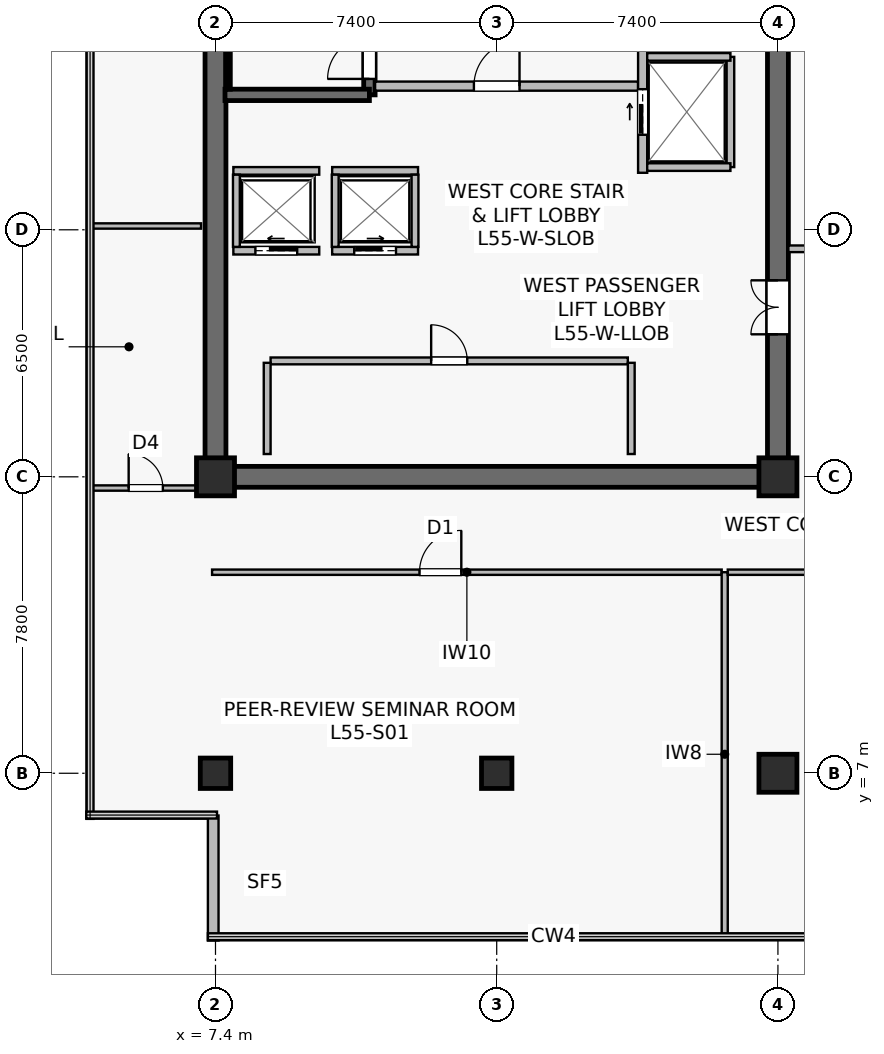
"""IFC4 building model, lengths in metres.
Left out: names, types, materials, properties, quantities, classifications, styles, units other than length and angle.
Written with IfcOpenShell. Run it as: python <this file> out.ifc"""

import sys

from ifc_helpers import new_model, si_unit, direction, frame, frame_2d, origin, origin_2d, place, context, subcontext, project, spatial, rectangle, extrude, source, transform, mapped, element, fill, save


model = new_model("IFC4")
c1 = context("Model", 3, precision=1e-05, world=origin(), true_north=direction((0.0, 1.0)))
c2 = subcontext(c1, "Body", "Model", "MODEL_VIEW")
j1 = project(units=[si_unit("LENGTHUNIT", "METRE"), si_unit("PLANEANGLEUNIT", "RADIAN")], contexts=[c1])
p1 = place(None, origin())
s1 = spatial("IfcSite", under=j1, at=p1, CompositionType="ELEMENT")
p2 = place(p1, origin())
s2 = spatial("IfcBuilding", under=s1, at=p2, CompositionType="ELEMENT")
p3 = place(p2, frame((0.0, 0.0, 230.1)))
s3 = spatial("IfcBuildingStorey", under=s2, at=p3, CompositionType="ELEMENT", Elevation=230.1)
p4 = place(p3, frame((7.125, 14.8, 0.0), z_axis=(0.0, 0.0, 1.0), x_axis=(1.0, 0.0, 0.0)))
e1 = element("IfcWall", 1, at=p4, inside=s3, PredefinedType="SHEAR", context=c2, shape_type="SweptSolid", body=[
    extrude(rectangle(XDim=15.35, YDim=0.55, at=frame_2d((7.675, 0.0))), origin(), (0.0, 0.0, 1.0), 3.8),
])
p5 = place(p3, frame((7.4, 15.075, 0.0), z_axis=(0.0, 0.0, 1.0), x_axis=(0.0, 1.0, 0.0)))
e2 = element("IfcWall", 2, at=p5, inside=s3, PredefinedType="SHEAR", context=c2, shape_type="SweptSolid", body=[
    extrude(rectangle(XDim=18.45, YDim=0.55, at=frame_2d((9.225, 0.0))), origin(), (0.0, 0.0, 1.0), 3.8),
])
p6 = place(p3, frame((22.2, 15.075, 0.0), z_axis=(0.0, 0.0, 1.0), x_axis=(0.0, 1.0, 0.0)))
e3 = element("IfcWall", 3, at=p6, inside=s3, PredefinedType="SHEAR", context=c2, shape_type="SweptSolid", body=[
    extrude(rectangle(XDim=18.45, YDim=0.55, at=frame_2d((9.225, 0.0))), origin(), (0.0, 0.0, 1.0), 3.8),
])
p7 = place(p6, frame((3.475, 0.0, 0.0)))
e4 = element("IfcOpeningElement", 4, at=p7, cuts=e3, PredefinedType="OPENING", context=c2, shape_type="SweptSolid", body=[
    extrude(rectangle(XDim=1.42, YDim=2.2, at=frame_2d((0.71, 1.1))), frame((0.0, 0.285, 0.0), z_axis=(0.0, -1.0, 0.0), x_axis=(1.0, 0.0, 0.0)), (0.0, 0.0, 1.0), 0.57),
])
p8 = place(p3, frame((11.45, 24.85, 0.0), z_axis=(0.0, 0.0, 1.0), x_axis=(0.0, 1.0, 0.0)))
e5 = element("IfcWall", 5, at=p8, inside=s3, PredefinedType="SHEAR", context=c2, shape_type="SweptSolid", body=[
    extrude(rectangle(XDim=8.63, YDim=0.3, at=frame_2d((4.315, 0.0))), origin(), (0.0, 0.0, 1.0), 3.8),
])
p9 = place(p8, frame((0.42, 0.0, 0.0)))
e6 = element("IfcOpeningElement", 6, at=p9, cuts=e5, PredefinedType="OPENING", context=c2, shape_type="SweptSolid", body=[
    extrude(rectangle(XDim=1.1, YDim=2.15, at=frame_2d((0.55, 1.075))), frame((0.0, 0.16, 0.0), z_axis=(0.0, -1.0, 0.0), x_axis=(1.0, 0.0, 0.0)), (0.0, 0.0, 1.0), 0.32),
])
p10 = place(p3, frame((7.65, 24.85, 0.0), z_axis=(0.0, 0.0, 1.0), x_axis=(1.0, 0.0, 0.0)))
e7 = element("IfcWall", 7, at=p10, inside=s3, PredefinedType="SHEAR", context=c2, shape_type="SweptSolid", body=[
    extrude(rectangle(XDim=3.8, YDim=0.3, at=frame_2d((1.9, 0.0))), origin(), (0.0, 0.0, 1.0), 3.8),
])
p11 = place(p3, frame((7.73, 25.0, 0.0), z_axis=(0.0, 0.0, 1.0), x_axis=(0.0, 1.0, 0.0)))
e8 = element("IfcWall", 8, at=p11, inside=s3, PredefinedType="SOLIDWALL", context=c2, shape_type="SweptSolid", body=[
    extrude(rectangle(XDim=8.32, YDim=0.12, at=frame_2d((4.16, 0.0))), origin(), (0.0, 0.0, 1.0), 3.8),
])
m1 = source(origin(), c2, "Body", "SweptSolid", [
    extrude(rectangle(XDim=0.8, YDim=0.8, at=origin_2d()), origin(), (0.0, 0.0, 1.0), 4.1),
])
p12 = place(p3, frame((14.8, 7.0, 0.0), z_axis=(0.0, 0.0, 1.0), x_axis=(1.0, 0.0, 0.0)))
e9 = element("IfcColumn", 9, at=p12, inside=s3, PredefinedType="COLUMN", context=c2, shape_type="MappedRepresentation", body=[
    mapped(m1, transform((0.0, 0.0, 0.0), scale=1.0)),
])
m2 = source(origin(), c2, "Body", "SweptSolid", [
    extrude(rectangle(XDim=1.0, YDim=1.0, at=origin_2d()), origin(), (0.0, 0.0, 1.0), 4.1),
])
for number, where, z_axis, x_axis in (
    (10, (22.2, 7.0, 0.0), (0.0, 0.0, 1.0), (1.0, 0.0, 0.0)),
    (11, (7.4, 14.8, 0.0), (0.0, 0.0, 1.0), (1.0, 0.0, 0.0)),
    (12, (22.2, 14.8, 0.0), (0.0, 0.0, 1.0), (1.0, 0.0, 0.0)),
):
    element("IfcColumn", number, at=place(p3, frame(where, z_axis=z_axis, x_axis=x_axis)), inside=s3, PredefinedType="COLUMN", context=c2, shape_type="MappedRepresentation", body=[
        mapped(m2, transform((0.0, 0.0, 0.0), scale=1.0)),
    ])
p13 = place(p3, frame((7.4, 7.0, 0.0), z_axis=(0.0, 0.0, 1.0), x_axis=(1.0, 0.0, 0.0)))
e13 = element("IfcColumn", 13, at=p13, inside=s3, PredefinedType="COLUMN", context=c2, shape_type="MappedRepresentation", body=[
    mapped(m1, transform((0.0, 0.0, 0.0), scale=1.0)),
])
p14 = place(p3, frame((7.34, 5.888, 0.0), z_axis=(0.0, 0.0, 1.0), x_axis=(0.0, -1.0, 0.0)))
e14 = element("IfcWall", 14, at=p14, inside=s3, PredefinedType="STANDARD", context=c2, shape_type="SweptSolid", body=[
    extrude(rectangle(XDim=3.288, YDim=0.28, at=frame_2d((1.644, 0.0))), origin(), (0.0, 0.0, 1.0), 3.8),
])
p15 = place(p3, frame((11.6, 25.08, 0.0), z_axis=(0.0, 0.0, 1.0), x_axis=(1.0, 0.0, 0.0)))
e15 = element("IfcWall", 15, at=p15, inside=s3, PredefinedType="SOLIDWALL", context=c2, shape_type="SweptSolid", body=[
    extrude(rectangle(XDim=6.92, YDim=0.24, at=frame_2d((3.46, 0.0))), origin(), (0.0, 0.0, 1.0), 3.197),
])
p16 = place(p15, frame((2.6, 0.0, 0.0)))
e16 = element("IfcOpeningElement", 16, at=p16, cuts=e15, PredefinedType="OPENING", context=c2, shape_type="SweptSolid", body=[
    extrude(rectangle(XDim=1.2, YDim=2.16, at=frame_2d((0.6, 1.08))), frame((0.0, 0.13, 0.0), z_axis=(0.0, -1.0, 0.0), x_axis=(1.0, 0.0, 0.0)), (0.0, 0.0, 1.0), 0.26),
])
p17 = place(p3, frame((18.64, 22.8, 0.0), z_axis=(0.0, 0.0, 1.0), x_axis=(0.0, 1.0, 0.0)))
e17 = element("IfcWall", 17, at=p17, inside=s3, PredefinedType="SOLIDWALL", context=c2, shape_type="SweptSolid", body=[
    extrude(rectangle(XDim=6.85, YDim=0.24, at=frame_2d((3.425, 0.0))), origin(), (0.0, 0.0, 1.0), 2.935),
])
p18 = place(p17, frame((4.85, 0.0, 0.0)))
e18 = element("IfcOpeningElement", 18, at=p18, cuts=e17, PredefinedType="OPENING", context=c2, shape_type="SweptSolid", body=[
    extrude(rectangle(XDim=1.1, YDim=2.22, at=frame_2d((0.55, 1.11))), frame((0.0, 0.13, 0.0), z_axis=(0.0, -1.0, 0.0), x_axis=(1.0, 0.0, 0.0)), (0.0, 0.0, 1.0), 0.26),
])
p19 = place(p17, frame((1.0, 0.0, 0.0)))
e19 = element("IfcOpeningElement", 19, at=p19, cuts=e17, PredefinedType="OPENING", context=c2, shape_type="SweptSolid", body=[
    extrude(rectangle(XDim=1.2, YDim=2.22, at=frame_2d((0.6, 1.11))), frame((0.0, 0.13, 0.0), z_axis=(0.0, -1.0, 0.0), x_axis=(1.0, 0.0, 0.0)), (0.0, 0.0, 1.0), 0.26),
])
p20 = place(p3, frame((7.87, 20.75, 0.0), z_axis=(0.0, 0.0, 1.0), x_axis=(1.0, 0.0, 0.0)))
e20 = element("IfcWall", 20, at=p20, inside=s3, PredefinedType="SOLIDWALL", context=c2, shape_type="SweptSolid", body=[
    extrude(rectangle(XDim=2.26, YDim=0.2, at=frame_2d((1.13, 0.0))), origin(), (0.0, 0.0, 1.0), 3.8),
])
p21 = place(p20, frame((0.58, 0.0, 0.0)))
e21 = element("IfcOpeningElement", 21, at=p21, cuts=e20, PredefinedType="OPENING", context=c2, shape_type="SweptSolid", body=[
    extrude(rectangle(XDim=1.1, YDim=2.22, at=frame_2d((0.55, 1.11))), frame((0.0, 0.11, 0.0), z_axis=(0.0, -1.0, 0.0), x_axis=(1.0, 0.0, 0.0)), (0.0, 0.0, 1.0), 0.22),
])
p22 = place(p3, frame((7.87, 22.85, 0.0), z_axis=(0.0, 0.0, 1.0), x_axis=(1.0, 0.0, 0.0)))
e22 = element("IfcWall", 22, at=p22, inside=s3, PredefinedType="SOLIDWALL", context=c2, shape_type="SweptSolid", body=[
    extrude(rectangle(XDim=2.26, YDim=0.2, at=frame_2d((1.13, 0.0))), origin(), (0.0, 0.0, 1.0), 3.8),
])
p23 = place(p3, frame((7.95, 20.85, 0.0), z_axis=(0.0, 0.0, 1.0), x_axis=(0.0, 1.0, 0.0)))
e23 = element("IfcWall", 23, at=p23, inside=s3, PredefinedType="SOLIDWALL", context=c2, shape_type="SweptSolid", body=[
    extrude(rectangle(XDim=1.9, YDim=0.18, at=frame_2d((0.95, 0.0))), origin(), (0.0, 0.0, 1.0), 3.8),
])
p24 = place(p3, frame((10.47, 20.75, 0.0), z_axis=(0.0, 0.0, 1.0), x_axis=(1.0, 0.0, 0.0)))
e24 = element("IfcWall", 24, at=p24, inside=s3, PredefinedType="SOLIDWALL", context=c2, shape_type="SweptSolid", body=[
    extrude(rectangle(XDim=2.26, YDim=0.2, at=frame_2d((1.13, 0.0))), origin(), (0.0, 0.0, 1.0), 3.8),
])
p25 = place(p24, frame((0.58, 0.0, 0.0)))
e25 = element("IfcOpeningElement", 25, at=p25, cuts=e24, PredefinedType="OPENING", context=c2, shape_type="SweptSolid", body=[
    extrude(rectangle(XDim=1.1, YDim=2.22, at=frame_2d((0.55, 1.11))), frame((0.0, 0.11, 0.0), z_axis=(0.0, -1.0, 0.0), x_axis=(1.0, 0.0, 0.0)), (0.0, 0.0, 1.0), 0.22),
])
p26 = place(p3, frame((10.47, 22.85, 0.0), z_axis=(0.0, 0.0, 1.0), x_axis=(1.0, 0.0, 0.0)))
e26 = element("IfcWall", 26, at=p26, inside=s3, PredefinedType="SOLIDWALL", context=c2, shape_type="SweptSolid", body=[
    extrude(rectangle(XDim=2.26, YDim=0.2, at=frame_2d((1.13, 0.0))), origin(), (0.0, 0.0, 1.0), 3.8),
])
for number, where, z_axis, x_axis in (
    (27, (10.55, 20.85, 0.0), (0.0, 0.0, 1.0), (0.0, 1.0, 0.0)),
    (28, (12.65, 20.85, 0.0), (0.0, 0.0, 1.0), (0.0, 1.0, 0.0)),
):
    element("IfcWall", number, at=place(p3, frame(where, z_axis=z_axis, x_axis=x_axis)), inside=s3, PredefinedType="SOLIDWALL", context=c2, shape_type="SweptSolid", body=[
        extrude(rectangle(XDim=1.9, YDim=0.18, at=frame_2d((0.95, 0.0))), origin(), (0.0, 0.0, 1.0), 3.8),
    ])
p27 = place(p3, frame((20.95, 22.95, 0.0), z_axis=(0.0, 0.0, 1.0), x_axis=(0.0, 1.0, 0.0)))
e29 = element("IfcWall", 29, at=p27, inside=s3, PredefinedType="SOLIDWALL", context=c2, shape_type="SweptSolid", body=[
    extrude(rectangle(XDim=2.9, YDim=0.2, at=frame_2d((1.45, 0.0))), origin(), (0.0, 0.0, 1.0), 2.935),
])
for number, where, z_axis, x_axis in (
    (30, (18.76, 25.85, 0.0), (0.0, 0.0, 1.0), (1.0, 0.0, 0.0)),
    (31, (18.76, 22.95, 0.0), (0.0, 0.0, 1.0), (1.0, 0.0, 0.0)),
):
    element("IfcWall", number, at=place(p3, frame(where, z_axis=z_axis, x_axis=x_axis)), inside=s3, PredefinedType="SOLIDWALL", context=c2, shape_type="SweptSolid", body=[
        extrude(rectangle(XDim=2.19, YDim=0.2, at=frame_2d((1.095, 0.0))), origin(), (0.0, 0.0, 1.0), 3.8),
    ])
p28 = place(p3, frame((8.85, 17.85, 0.0), z_axis=(0.0, 0.0, 1.0), x_axis=(1.0, 0.0, 0.0)))
e32 = element("IfcWall", 32, at=p28, inside=s3, PredefinedType="SOLIDWALL", context=c2, shape_type="SweptSolid", body=[
    extrude(rectangle(XDim=9.4, YDim=0.18, at=frame_2d((4.7, 0.0))), origin(), (0.0, 0.0, 1.0), 3.197),
])
p29 = place(p28, frame((4.225, 0.0, 0.0)))
e33 = element("IfcOpeningElement", 33, at=p29, cuts=e32, PredefinedType="OPENING", context=c2, shape_type="SweptSolid", body=[
    extrude(rectangle(XDim=0.95, YDim=2.15, at=frame_2d((0.475, 1.075))), frame((0.0, 0.1, 0.0), z_axis=(0.0, -1.0, 0.0), x_axis=(1.0, 0.0, 0.0)), (0.0, 0.0, 1.0), 0.2),
])
for number, where, z_axis, x_axis in (
    (34, (18.34, 15.4, 0.0), (0.0, 0.0, 1.0), (0.0, 1.0, 0.0)),
    (35, (8.76, 15.4, 0.0), (0.0, 0.0, 1.0), (0.0, 1.0, 0.0)),
):
    element("IfcWall", number, at=place(p3, frame(where, z_axis=z_axis, x_axis=x_axis)), inside=s3, PredefinedType="SOLIDWALL", context=c2, shape_type="SweptSolid", body=[
        extrude(rectangle(XDim=2.4, YDim=0.18, at=frame_2d((1.2, 0.0))), origin(), (0.0, 0.0, 1.0), 3.8),
    ])
p30 = place(p3, frame((22.475, 20.8, 0.0), z_axis=(0.0, 0.0, 1.0), x_axis=(1.0, 0.0, 0.0)))
e36 = element("IfcWall", 36, at=p30, inside=s3, PredefinedType="PARTITIONING", context=c2, shape_type="SweptSolid", body=[
    extrude(rectangle(XDim=4.025, YDim=0.175, at=frame_2d((2.012, 0.0))), origin(), (0.0, 0.0, 1.0), 3.8),
])
p31 = place(p30, frame((1.35, 0.0, 0.0)))
e37 = element("IfcOpeningElement", 37, at=p31, cuts=e36, PredefinedType="OPENING", context=c2, shape_type="SweptSolid", body=[
    extrude(rectangle(XDim=0.95, YDim=2.15, at=frame_2d((0.475, 1.075))), frame((0.0, 0.098, 0.0), z_axis=(0.0, -1.0, 0.0), x_axis=(1.0, 0.0, 0.0)), (0.0, 0.0, 1.0), 0.195),
])
p32 = place(p3, frame((7.31, 12.29, 0.0), z_axis=(0.0, 0.0, 1.0), x_axis=(1.0, 0.0, 0.0)))
e38 = element("IfcWall", 38, at=p32, inside=s3, PredefinedType="PARTITIONING", context=c2, shape_type="SweptSolid", body=[
    extrude(rectangle(XDim=13.41, YDim=0.14, at=frame_2d((6.705, 0.0))), origin(), (0.0, 0.0, 1.0), 3.197),
])
p33 = place(p32, frame((5.458, 0.0, 0.0)))
e39 = element("IfcOpeningElement", 39, at=p33, cuts=e38, PredefinedType="OPENING", context=c2, shape_type="SweptSolid", body=[
    extrude(rectangle(XDim=1.1, YDim=2.18, at=frame_2d((0.55, 1.09))), frame((0.0, 0.08, 0.0), z_axis=(0.0, -1.0, 0.0), x_axis=(1.0, 0.0, 0.0)), (0.0, 0.0, 1.0), 0.16),
])
p34 = place(p3, frame((20.8, 2.71, 0.0), z_axis=(0.0, 0.0, 1.0), x_axis=(0.0, 1.0, 0.0)))
e40 = element("IfcWall", 40, at=p34, inside=s3, PredefinedType="PARTITIONING", context=c2, shape_type="SweptSolid", body=[
    extrude(rectangle(XDim=9.58, YDim=0.16, at=frame_2d((4.79, 0.0))), origin(), (0.0, 0.0, 1.0), 3.135),
])
p35 = place(p3, frame((20.88, 12.29, 0.0), z_axis=(0.0, 0.0, 1.0), x_axis=(1.0, 0.0, 0.0)))
e41 = element("IfcWall", 41, at=p35, inside=s3, PredefinedType="PARTITIONING", context=c2, shape_type="SweptSolid", body=[
    extrude(rectangle(XDim=23.24, YDim=0.14, at=frame_2d((11.62, 0.0))), origin(), (0.0, 0.0, 1.0), 3.197),
])
p36 = place(p35, frame((12.356, 0.0, 0.0)))
e42 = element("IfcOpeningElement", 42, at=p36, cuts=e41, PredefinedType="OPENING", context=c2, shape_type="SweptSolid", body=[
    extrude(rectangle(XDim=1.1, YDim=2.18, at=frame_2d((0.55, 1.09))), frame((0.0, 0.08, 0.0), z_axis=(0.0, -1.0, 0.0), x_axis=(1.0, 0.0, 0.0)), (0.0, 0.0, 1.0), 0.16),
])
p37 = place(p3, frame((4.11, 21.4, 0.0), z_axis=(0.0, 0.0, 1.0), x_axis=(1.0, 0.0, 0.0)))
e43 = element("IfcWall", 43, at=p37, inside=s3, PredefinedType="PARTITIONING", context=c2, shape_type="SweptSolid", body=[
    extrude(rectangle(XDim=2.91, YDim=0.14, at=frame_2d((1.455, 0.0))), origin(), (0.0, 0.0, 1.0), 3.8),
])
p38 = place(p3, frame((4.11, 14.505, 0.0), z_axis=(0.0, 0.0, 1.0), x_axis=(1.0, 0.0, 0.0)))
e44 = element("IfcWall", 44, at=p38, inside=s3, PredefinedType="PARTITIONING", context=c2, shape_type="SweptSolid", body=[
    extrude(rectangle(XDim=2.91, YDim=0.14, at=frame_2d((1.455, 0.0))), origin(), (0.0, 0.0, 1.0), 3.8),
])
p39 = place(p38, frame((1.005, 0.0, 0.0)))
e45 = element("IfcOpeningElement", 45, at=p39, cuts=e44, PredefinedType="OPENING", context=c2, shape_type="SweptSolid", body=[
    extrude(rectangle(XDim=0.9, YDim=2.1, at=frame_2d((0.45, 1.05))), frame((0.0, 0.08, 0.0), z_axis=(0.0, -1.0, 0.0), x_axis=(1.0, 0.0, 0.0)), (0.0, 0.0, 1.0), 0.16),
])
m3 = source(origin(), c2, "Body", "SweptSolid", [
    extrude(rectangle(XDim=1.1, YDim=2.15, at=frame_2d((0.55, 1.075))), frame((0.0, 0.025, 0.0), z_axis=(0.0, -1.0, 0.0), x_axis=(1.0, 0.0, 0.0)), (0.0, 0.0, 1.0), 0.05),
])
p40 = place(p9, origin())
e46 = element("IfcDoor", 46, at=p40, inside=s3, OperationType="SINGLE_SWING_LEFT", PredefinedType="DOOR", context=c2, shape_type="MappedRepresentation", body=[
    mapped(m3, transform((0.0, 0.0, 0.0), scale=1.0)),
])
fill(e6, e46)
m4 = source(origin(), c2, "Body", "SweptSolid", [
    extrude(rectangle(XDim=1.2, YDim=2.16, at=frame_2d((0.6, 1.08))), frame((0.0, 0.025, 0.0), z_axis=(0.0, -1.0, 0.0), x_axis=(1.0, 0.0, 0.0)), (0.0, 0.0, 1.0), 0.05),
])
p41 = place(p16, origin())
e47 = element("IfcDoor", 47, at=p41, inside=s3, OperationType="SINGLE_SWING_RIGHT", PredefinedType="DOOR", context=c2, shape_type="MappedRepresentation", body=[
    mapped(m4, transform((0.0, 0.0, 0.0), scale=1.0)),
])
fill(e16, e47)
m5 = source(origin(), c2, "Body", "SweptSolid", [
    extrude(rectangle(XDim=1.1, YDim=2.22, at=frame_2d((0.55, 1.11))), frame((0.0, 0.025, 0.0), z_axis=(0.0, -1.0, 0.0), x_axis=(1.0, 0.0, 0.0)), (0.0, 0.0, 1.0), 0.05),
])
p42 = place(p21, origin())
e48 = element("IfcDoor", 48, at=p42, inside=s3, OperationType="SLIDING_TO_LEFT", PredefinedType="USERDEFINED", context=c2, shape_type="MappedRepresentation", body=[
    mapped(m5, transform((0.0, 0.0, 0.0), scale=1.0)),
])
fill(e21, e48)
p43 = place(p25, origin())
e49 = element("IfcDoor", 49, at=p43, inside=s3, OperationType="SLIDING_TO_RIGHT", PredefinedType="USERDEFINED", context=c2, shape_type="MappedRepresentation", body=[
    mapped(m5, transform((0.0, 0.0, 0.0), scale=1.0)),
])
fill(e25, e49)
m6 = source(origin(), c2, "Body", "SweptSolid", [
    extrude(rectangle(XDim=1.2, YDim=2.22, at=frame_2d((0.6, 1.11))), frame((0.0, 0.025, 0.0), z_axis=(0.0, -1.0, 0.0), x_axis=(1.0, 0.0, 0.0)), (0.0, 0.0, 1.0), 0.05),
])
p44 = place(p19, origin())
e50 = element("IfcDoor", 50, at=p44, inside=s3, OperationType="SLIDING_TO_RIGHT", PredefinedType="USERDEFINED", context=c2, shape_type="MappedRepresentation", body=[
    mapped(m6, transform((0.0, 0.0, 0.0), scale=1.0)),
])
fill(e19, e50)
m7 = source(origin(), c2, "Body", "SweptSolid", [
    extrude(rectangle(XDim=0.95, YDim=2.15, at=frame_2d((0.475, 1.075))), frame((0.0, 0.025, 0.0), z_axis=(0.0, -1.0, 0.0), x_axis=(1.0, 0.0, 0.0)), (0.0, 0.0, 1.0), 0.05),
])
p45 = place(p29, origin())
e51 = element("IfcDoor", 51, at=p45, inside=s3, OperationType="SINGLE_SWING_LEFT", PredefinedType="DOOR", context=c2, shape_type="MappedRepresentation", body=[
    mapped(m7, transform((0.0, 0.0, 0.0), scale=1.0)),
])
fill(e33, e51)
m8 = source(origin(), c2, "Body", "SweptSolid", [
    extrude(rectangle(XDim=1.42, YDim=2.2, at=frame_2d((0.71, 1.1))), frame((0.0, 0.025, 0.0), z_axis=(0.0, -1.0, 0.0), x_axis=(1.0, 0.0, 0.0)), (0.0, 0.0, 1.0), 0.05),
])
p46 = place(p7, origin())
e52 = element("IfcDoor", 52, at=p46, inside=s3, OperationType="DOUBLE_DOOR_SINGLE_SWING", PredefinedType="DOOR", context=c2, shape_type="MappedRepresentation", body=[
    mapped(m8, transform((0.0, 0.0, 0.0), scale=1.0)),
])
fill(e4, e52)
m9 = source(origin(), c2, "Body", "SweptSolid", [
    extrude(rectangle(XDim=1.1, YDim=2.18, at=frame_2d((0.55, 1.09))), frame((0.0, 0.025, 0.0), z_axis=(0.0, -1.0, 0.0), x_axis=(1.0, 0.0, 0.0)), (0.0, 0.0, 1.0), 0.05),
])
p47 = place(p33, origin())
e53 = element("IfcDoor", 53, at=p47, inside=s3, OperationType="SINGLE_SWING_RIGHT", PredefinedType="DOOR", context=c2, shape_type="MappedRepresentation", body=[
    mapped(m9, transform((0.0, 0.0, 0.0), scale=1.0)),
])
fill(e39, e53)
m10 = source(origin(), c2, "Body", "SweptSolid", [
    extrude(rectangle(XDim=0.9, YDim=2.1, at=frame_2d((0.45, 1.05))), frame((0.0, 0.025, 0.0), z_axis=(0.0, -1.0, 0.0), x_axis=(1.0, 0.0, 0.0)), (0.0, 0.0, 1.0), 0.05),
])
p48 = place(p39, origin())
e54 = element("IfcDoor", 54, at=p48, inside=s3, OperationType="SINGLE_SWING_LEFT", PredefinedType="DOOR", context=c2, shape_type="MappedRepresentation", body=[
    mapped(m10, transform((0.0, 0.0, 0.0), scale=1.0)),
])
fill(e45, e54)
save(model, sys.argv[1])
